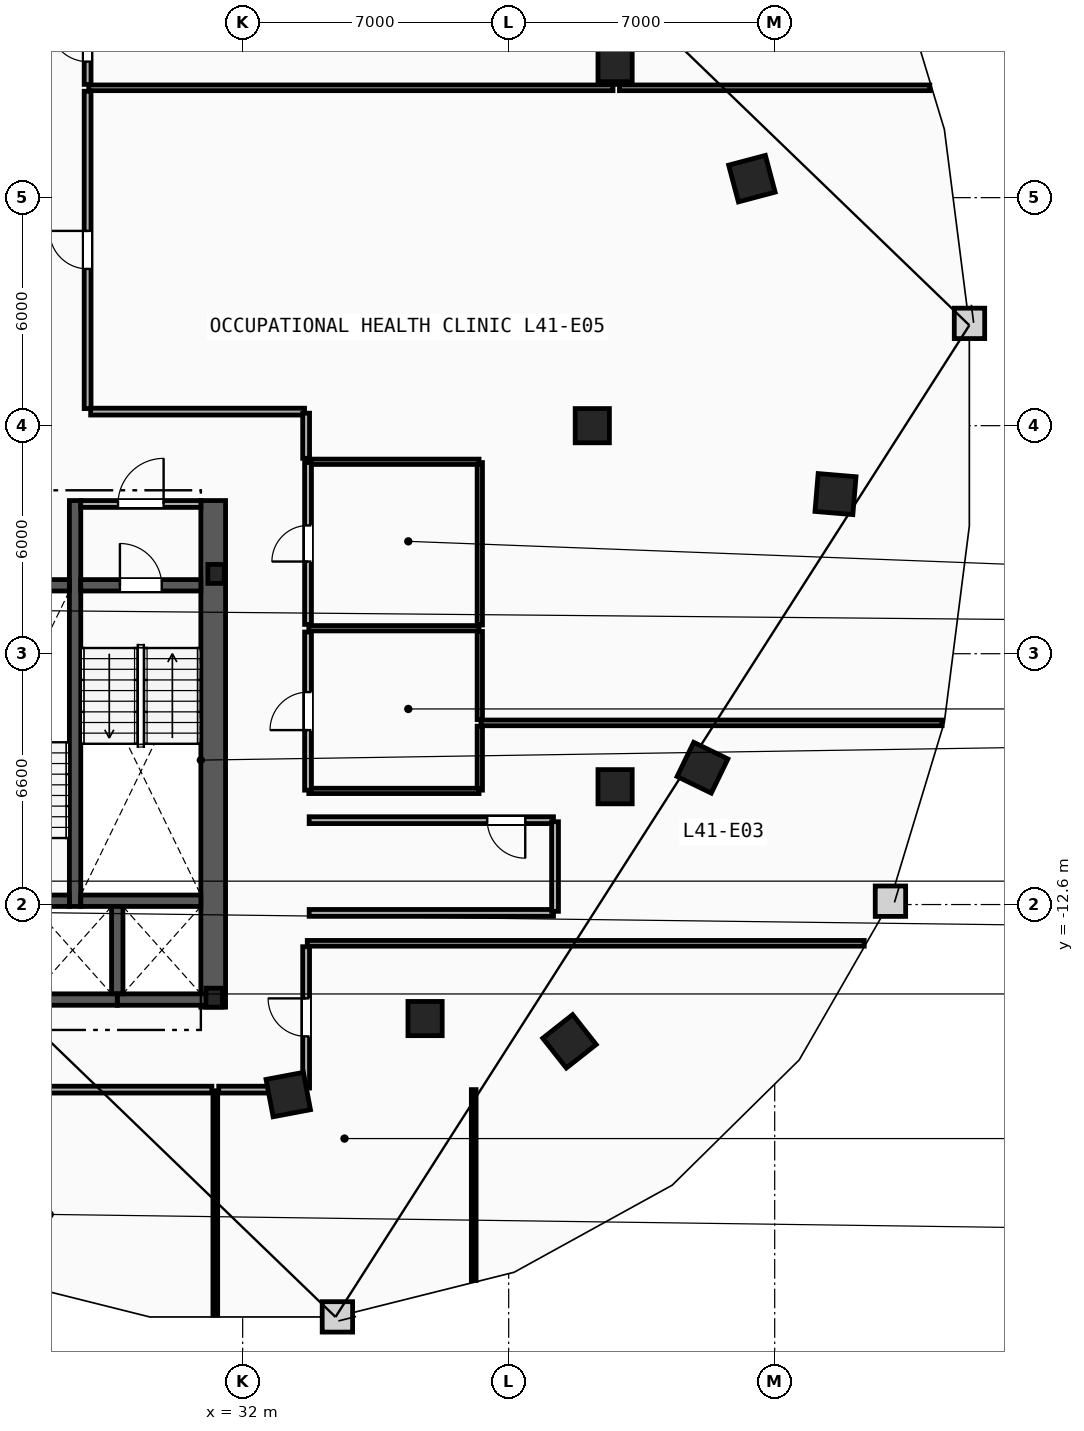
"""IFC4 building model, lengths in metres.
Left out: names, types, materials, properties, quantities, classifications, styles, units other than length and angle.
Written with IfcOpenShell. Run it as: python <this file> out.ifc"""

import sys

from ifc_helpers import new_model, si_unit, direction, frame, frame_2d, origin, origin_2d, place, context, subcontext, project, spatial, rectangle, i_section, extrude, element, fill, save


model = new_model("IFC4")
c1 = context("Model", 3, precision=1e-05, world=origin(), true_north=direction((0.0, 1.0)))
c2 = subcontext(c1, "Body", "Model", "MODEL_VIEW")
j1 = project(units=[si_unit("LENGTHUNIT", "METRE"), si_unit("PLANEANGLEUNIT", "RADIAN")], contexts=[c1])
p1 = place(None, origin())
s1 = spatial("IfcSite", under=j1, at=p1, CompositionType="ELEMENT")
p2 = place(p1, origin())
s2 = spatial("IfcBuilding", under=s1, at=p2, CompositionType="ELEMENT")
p3 = place(p2, frame((0.0, 0.0, 158.4)))
s3 = spatial("IfcBuildingStorey", under=s2, at=p3, CompositionType="ELEMENT", Elevation=158.4)
for number, where, z_axis, x_axis in (
    (1, (31.3, -3.9, 0.0), (0.0, 0.0, 1.0), (1.0, 0.0, 0.0)),
    (2, (31.25, -15.05, 0.0), (0.0, 0.0, 1.0), (1.0, 0.0, 0.0)),
):
    element("IfcColumn", number, at=place(p3, frame(where, z_axis=z_axis, x_axis=x_axis)), inside=s3, PredefinedType="COLUMN", context=c2, shape_type="SweptSolid", body=[
        extrude(i_section(OverallWidth=0.432, OverallDepth=0.498, WebThickness=0.056, FlangeThickness=0.089, FilletRadius=0.018, at=origin_2d()), origin(), (0.0, 0.0, 1.0), 3.6),
    ])
for number, where, z_axis, x_axis in (
    (3, (41.2, 0.0, 0.0), (0.0, 0.0, 1.0), (1.0, 0.0, 0.0)),
    (4, (41.8, -9.5, 0.0), (0.0, 0.0, 1.0), (1.0, 0.0, 0.0)),
    (5, (36.8, -15.6, 0.0), (0.0, 0.0, 1.0), (1.0, 0.0, 0.0)),
    (6, (41.8, 9.5, 0.0), (0.0, 0.0, 1.0), (1.0, 0.0, 0.0)),
):
    element("IfcColumn", number, at=place(p3, frame(where, z_axis=z_axis, x_axis=x_axis)), inside=s3, PredefinedType="COLUMN", context=c2, shape_type="SweptSolid", body=[
        extrude(rectangle(XDim=0.9, YDim=0.9, at=origin_2d()), origin(), (0.0, 0.0, 1.0), 3.6),
    ])
for number, where, z_axis, x_axis in (
    (7, (33.2, -17.6, 0.0), (0.0, 0.0, 1.0), (0.983, 0.186, 0.0)),
    (8, (40.6, -16.2, 0.0), (0.0, 0.0, 1.0), (0.785, 0.619, 0.0)),
    (9, (44.1, -9.0, 0.0), (0.0, 0.0, 1.0), (0.437, 0.899, 0.0)),
    (10, (47.6, -1.8, 0.0), (0.0, 0.0, 1.0), (0.084, 0.997, 0.0)),
    (11, (45.4, 6.5, 0.0), (0.0, 0.0, 1.0), (-0.256, 0.967, 0.0)),
):
    element("IfcColumn", number, at=place(p3, frame(where, z_axis=z_axis, x_axis=x_axis)), inside=s3, PredefinedType="COLUMN", context=c2, shape_type="SweptSolid", body=[
        extrude(rectangle(XDim=1.0, YDim=1.0, at=origin_2d()), origin(), (0.0, 0.0, 1.0), 3.6),
    ])
p4 = place(p3, frame((31.225, -15.3, 0.0), z_axis=(0.0, 0.0, 1.0), x_axis=(0.0, 1.0, 0.0)))
e12 = element("IfcWall", 12, at=p4, inside=s3, PredefinedType="SHEAR", context=c2, shape_type="SweptSolid", body=[
    extrude(rectangle(XDim=13.33, YDim=0.65, at=frame_2d((6.665, 0.0))), origin(), (0.0, 0.0, 1.0), 3.36),
])
p5 = place(p3, frame((27.59, -12.65, 0.0), z_axis=(0.0, 0.0, 1.0), x_axis=(0.0, 1.0, 0.0)))
e13 = element("IfcWall", 13, at=p5, inside=s3, PredefinedType="SHEAR", context=c2, shape_type="SweptSolid", body=[
    extrude(rectangle(XDim=10.68, YDim=0.3, at=frame_2d((5.34, 0.0))), origin(), (0.0, 0.0, 1.0), 3.36),
])
p6 = place(p3, frame((27.74, -4.2, 0.0), z_axis=(0.0, 0.0, 1.0), x_axis=(1.0, 0.0, 0.0)))
e14 = element("IfcWall", 14, at=p6, inside=s3, PredefinedType="SHEAR", context=c2, shape_type="SweptSolid", body=[
    extrude(rectangle(XDim=3.16, YDim=0.3, at=frame_2d((1.58, 0.0))), origin(), (0.0, 0.0, 1.0), 3.36),
])
p7 = place(p6, frame((1.03, 0.0, 0.0)))
e15 = element("IfcOpeningElement", 15, at=p7, cuts=e14, PredefinedType="OPENING", context=c2, shape_type="SweptSolid", body=[
    extrude(rectangle(XDim=1.1, YDim=2.15, at=frame_2d((0.55, 1.075))), frame((0.0, 0.16, 0.0), z_axis=(0.0, -1.0, 0.0), x_axis=(1.0, 0.0, 0.0)), (0.0, 0.0, 1.0), 0.32),
])
p8 = place(p3, frame((27.74, -12.5, 0.0), z_axis=(0.0, 0.0, 1.0), x_axis=(1.0, 0.0, 0.0)))
e16 = element("IfcWall", 16, at=p8, inside=s3, PredefinedType="SHEAR", context=c2, shape_type="SweptSolid", body=[
    extrude(rectangle(XDim=3.16, YDim=0.3, at=frame_2d((1.58, 0.0))), origin(), (0.0, 0.0, 1.0), 3.36),
])
p9 = place(p3, frame((24.28, -12.5, 0.0), z_axis=(0.0, 0.0, 1.0), x_axis=(1.0, 0.0, 0.0)))
e17 = element("IfcWall", 17, at=p9, inside=s3, PredefinedType="SHEAR", context=c2, shape_type="SweptSolid", body=[
    extrude(rectangle(XDim=3.16, YDim=0.3, at=frame_2d((1.58, 0.0))), origin(), (0.0, 0.0, 1.0), 3.36),
])
p10 = place(p9, frame((1.03, 0.0, 0.0)))
e18 = element("IfcOpeningElement", 18, at=p10, cuts=e17, PredefinedType="OPENING", context=c2, shape_type="SweptSolid", body=[
    extrude(rectangle(XDim=1.1, YDim=2.15, at=frame_2d((0.55, 1.075))), frame((0.0, 0.16, 0.0), z_axis=(0.0, -1.0, 0.0), x_axis=(1.0, 0.0, 0.0)), (0.0, 0.0, 1.0), 0.32),
])
p11 = place(p3, frame((24.28, -4.2, 0.0), z_axis=(0.0, 0.0, 1.0), x_axis=(1.0, 0.0, 0.0)))
e19 = element("IfcWall", 19, at=p11, inside=s3, PredefinedType="SHEAR", context=c2, shape_type="SweptSolid", body=[
    extrude(rectangle(XDim=3.16, YDim=0.3, at=frame_2d((1.58, 0.0))), origin(), (0.0, 0.0, 1.0), 3.36),
])
p12 = place(p3, frame((27.74, -2.06, 0.0), z_axis=(0.0, 0.0, 1.0), x_axis=(1.0, 0.0, 0.0)))
e20 = element("IfcWall", 20, at=p12, inside=s3, PredefinedType="PARTITIONING", context=c2, shape_type="SweptSolid", body=[
    extrude(rectangle(XDim=3.16, YDim=0.18, at=frame_2d((1.58, 0.0))), origin(), (0.0, 0.0, 1.0), 3.36),
])
p13 = place(p12, frame((0.98, 0.0, 0.0)))
e21 = element("IfcOpeningElement", 21, at=p13, cuts=e20, PredefinedType="OPENING", context=c2, shape_type="SweptSolid", body=[
    extrude(rectangle(XDim=1.2, YDim=2.15, at=frame_2d((0.6, 1.075))), frame((0.0, 0.1, 0.0), z_axis=(0.0, -1.0, 0.0), x_axis=(1.0, 0.0, 0.0)), (0.0, 0.0, 1.0), 0.2),
])
p14 = place(p3, frame((28.7, -15.1, 0.0), z_axis=(0.0, 0.0, 1.0), x_axis=(1.0, 0.0, 0.0)))
e22 = element("IfcWall", 22, at=p14, inside=s3, PredefinedType="SHEAR", context=c2, shape_type="SweptSolid", body=[
    extrude(rectangle(XDim=2.5, YDim=0.3, at=frame_2d((1.25, 0.0))), origin(), (0.0, 0.0, 1.0), 3.36),
])
p15 = place(p3, frame((28.7, -14.95, 0.0), z_axis=(0.0, 0.0, 1.0), x_axis=(0.0, 1.0, 0.0)))
e23 = element("IfcWall", 23, at=p15, inside=s3, PredefinedType="SHEAR", context=c2, shape_type="SweptSolid", body=[
    extrude(rectangle(XDim=2.3, YDim=0.3, at=frame_2d((1.15, 0.0))), origin(), (0.0, 0.0, 1.0), 3.36),
])
p16 = place(p3, frame((26.2, -15.1, 0.0), z_axis=(0.0, 0.0, 1.0), x_axis=(1.0, 0.0, 0.0)))
e24 = element("IfcWall", 24, at=p16, inside=s3, PredefinedType="SHEAR", context=c2, shape_type="SweptSolid", body=[
    extrude(rectangle(XDim=2.5, YDim=0.3, at=frame_2d((1.25, 0.0))), origin(), (0.0, 0.0, 1.0), 3.36),
])
p17 = place(p3, frame((38.24, -9.59, 0.0), z_axis=(0.0, 0.0, 1.0), x_axis=(0.0, 1.0, 0.0)))
e25 = element("IfcWall", 25, at=p17, inside=s3, PredefinedType="PARTITIONING", context=c2, shape_type="SweptSolid", body=[
    extrude(rectangle(XDim=1.685, YDim=0.14, at=frame_2d((0.843, 0.0))), origin(), (0.0, 0.0, 1.0), 3.36),
])
p18 = place(p3, frame((38.24, -7.735, 0.0), z_axis=(0.0, 0.0, 1.0), x_axis=(0.0, 1.0, 0.0)))
e26 = element("IfcWall", 26, at=p18, inside=s3, PredefinedType="PARTITIONING", context=c2, shape_type="SweptSolid", body=[
    extrude(rectangle(XDim=2.32, YDim=0.14, at=frame_2d((1.16, 0.0))), origin(), (0.0, 0.0, 1.0), 3.36),
])
p19 = place(p3, frame((38.24, -5.245, 0.0), z_axis=(0.0, 0.0, 1.0), x_axis=(0.0, 1.0, 0.0)))
e27 = element("IfcWall", 27, at=p19, inside=s3, PredefinedType="PARTITIONING", context=c2, shape_type="SweptSolid", body=[
    extrude(rectangle(XDim=4.275, YDim=0.14, at=frame_2d((2.138, 0.0))), origin(), (0.0, 0.0, 1.0), 3.36),
])
for number, where, z_axis, x_axis in (
    (28, (33.74, -0.95, 0.0), (0.0, 0.0, 1.0), (1.0, 0.0, 0.0)),
    (29, (33.74, -5.33, 0.0), (0.0, 0.0, 1.0), (1.0, 0.0, 0.0)),
    (30, (33.74, -9.61, 0.0), (0.0, 0.0, 1.0), (1.0, 0.0, 0.0)),
):
    element("IfcWall", number, at=place(p3, frame(where, z_axis=z_axis, x_axis=x_axis)), inside=s3, PredefinedType="PARTITIONING", context=c2, shape_type="SweptSolid", body=[
        extrude(rectangle(XDim=4.48, YDim=0.14, at=frame_2d((2.24, 0.0))), origin(), (0.0, 0.0, 1.0), 3.36),
    ])
p20 = place(p3, frame((33.72, -5.23, 0.0), z_axis=(0.0, 0.0, 1.0), x_axis=(0.0, 1.0, 0.0)))
e31 = element("IfcWall", 31, at=p20, inside=s3, PredefinedType="PARTITIONING", context=c2, shape_type="SweptSolid", body=[
    extrude(rectangle(XDim=4.26, YDim=0.18, at=frame_2d((2.13, 0.0))), origin(), (0.0, 0.0, 1.0), 3.36),
])
p21 = place(p20, frame((1.655, 0.0, 0.0)))
e32 = element("IfcOpeningElement", 32, at=p21, cuts=e31, PredefinedType="OPENING", context=c2, shape_type="SweptSolid", body=[
    extrude(rectangle(XDim=0.95, YDim=2.1, at=frame_2d((0.475, 1.05))), frame((0.0, 0.1, 0.0), z_axis=(0.0, -1.0, 0.0), x_axis=(1.0, 0.0, 0.0)), (0.0, 0.0, 1.0), 0.2),
])
p22 = place(p3, frame((33.72, -9.59, 0.0), z_axis=(0.0, 0.0, 1.0), x_axis=(0.0, 1.0, 0.0)))
e33 = element("IfcWall", 33, at=p22, inside=s3, PredefinedType="PARTITIONING", context=c2, shape_type="SweptSolid", body=[
    extrude(rectangle(XDim=4.16, YDim=0.18, at=frame_2d((2.08, 0.0))), origin(), (0.0, 0.0, 1.0), 3.36),
])
p23 = place(p22, frame((1.58, 0.0, 0.0)))
e34 = element("IfcOpeningElement", 34, at=p23, cuts=e33, PredefinedType="OPENING", context=c2, shape_type="SweptSolid", body=[
    extrude(rectangle(XDim=1.0, YDim=2.15, at=frame_2d((0.5, 1.075))), frame((0.0, 0.1, 0.0), z_axis=(0.0, -1.0, 0.0), x_axis=(1.0, 0.0, 0.0)), (0.0, 0.0, 1.0), 0.2),
])
p24 = place(p3, frame((27.95, 8.89, 0.0), z_axis=(0.0, 0.0, 1.0), x_axis=(1.0, 0.0, 0.0)))
e35 = element("IfcWall", 35, at=p24, inside=s3, PredefinedType="PARTITIONING", context=c2, shape_type="SweptSolid", body=[
    extrude(rectangle(XDim=13.795, YDim=0.15, at=frame_2d((6.897, 0.0))), origin(), (0.0, 0.0, 1.0), 3.36),
])
p25 = place(p3, frame((41.915, 8.89, 0.0), z_axis=(0.0, 0.0, 1.0), x_axis=(1.0, 0.0, 0.0)))
e36 = element("IfcWall", 36, at=p25, inside=s3, PredefinedType="PARTITIONING", context=c2, shape_type="SweptSolid", body=[
    extrude(rectangle(XDim=8.167, YDim=0.15, at=frame_2d((4.083, 0.0))), origin(), (0.0, 0.0, 1.0), 3.36),
])
p26 = place(p3, frame((38.27, -7.82, 0.0), z_axis=(0.0, 0.0, 1.0), x_axis=(1.0, 0.0, 0.0)))
e37 = element("IfcWall", 37, at=p26, inside=s3, PredefinedType="PARTITIONING", context=c2, shape_type="SweptSolid", body=[
    extrude(rectangle(XDim=12.136, YDim=0.15, at=frame_2d((6.068, 0.0))), origin(), (0.0, 0.0, 1.0), 3.36),
])
p27 = place(p3, frame((33.7, -13.62, 0.0), z_axis=(0.0, 0.0, 1.0), x_axis=(1.0, 0.0, 0.0)))
e38 = element("IfcWall", 38, at=p27, inside=s3, PredefinedType="PARTITIONING", context=c2, shape_type="SweptSolid", body=[
    extrude(rectangle(XDim=14.656, YDim=0.15, at=frame_2d((7.328, 0.0))), origin(), (0.0, 0.0, 1.0), 3.36),
])
p28 = place(p3, frame((31.28, -23.402, 0.0), z_axis=(0.0, 0.0, 1.0), x_axis=(0.0, 1.0, 0.0)))
e39 = element("IfcWall", 39, at=p28, inside=s3, PredefinedType="PARTITIONING", context=c2, shape_type="SweptSolid", body=[
    extrude(rectangle(XDim=5.902, YDim=0.125, at=frame_2d((2.951, 0.0))), origin(), (0.0, 0.0, 1.0), 3.36),
])
p29 = place(p3, frame((38.08, -22.491, 0.0), z_axis=(0.0, 0.0, 1.0), x_axis=(0.0, 1.0, 0.0)))
e40 = element("IfcWall", 40, at=p29, inside=s3, PredefinedType="PARTITIONING", context=c2, shape_type="SweptSolid", body=[
    extrude(rectangle(XDim=5.021, YDim=0.125, at=frame_2d((2.511, 0.0))), origin(), (0.0, 0.0, 1.0), 3.36),
])
p30 = place(p3, frame((18.342, -17.47, 0.0), z_axis=(0.0, 0.0, 1.0), x_axis=(1.0, 0.0, 0.0)))
e41 = element("IfcWall", 41, at=p30, inside=s3, PredefinedType="PARTITIONING", context=c2, shape_type="SweptSolid", body=[
    extrude(rectangle(XDim=12.848, YDim=0.18, at=frame_2d((6.424, 0.0))), origin(), (0.0, 0.0, 1.0), 3.36),
])
p31 = place(p30, frame((4.183, 0.0, 0.0)))
e42 = element("IfcOpeningElement", 42, at=p31, cuts=e41, PredefinedType="OPENING", context=c2, shape_type="SweptSolid", body=[
    extrude(rectangle(XDim=1.0, YDim=2.15, at=frame_2d((0.5, 1.075))), frame((0.0, 0.1, 0.0), z_axis=(0.0, -1.0, 0.0), x_axis=(1.0, 0.0, 0.0)), (0.0, 0.0, 1.0), 0.2),
])
p32 = place(p3, frame((33.67, -17.428, 0.0), z_axis=(0.0, 0.0, 1.0), x_axis=(0.0, 1.0, 0.0)))
e43 = element("IfcWall", 43, at=p32, inside=s3, PredefinedType="PARTITIONING", context=c2, shape_type="SweptSolid", body=[
    extrude(rectangle(XDim=3.719, YDim=0.18, at=frame_2d((1.859, 0.0))), origin(), (0.0, 0.0, 1.0), 3.36),
])
p33 = place(p32, frame((1.359, 0.0, 0.0)))
e44 = element("IfcOpeningElement", 44, at=p33, cuts=e43, PredefinedType="OPENING", context=c2, shape_type="SweptSolid", body=[
    extrude(rectangle(XDim=1.0, YDim=2.15, at=frame_2d((0.5, 1.075))), frame((0.0, 0.1, 0.0), z_axis=(0.0, -1.0, 0.0), x_axis=(1.0, 0.0, 0.0)), (0.0, 0.0, 1.0), 0.2),
])
p34 = place(p3, frame((31.37, -17.47, 0.0), z_axis=(0.0, 0.0, 1.0), x_axis=(1.0, 0.0, 0.0)))
e45 = element("IfcWall", 45, at=p34, inside=s3, PredefinedType="PARTITIONING", context=c2, shape_type="SweptSolid", body=[
    extrude(rectangle(XDim=2.258, YDim=0.18, at=frame_2d((1.129, 0.0))), origin(), (0.0, 0.0, 1.0), 3.36),
])
p35 = place(p3, frame((33.75, -12.82, 0.0), z_axis=(0.0, 0.0, 1.0), x_axis=(1.0, 0.0, 0.0)))
e46 = element("IfcWall", 46, at=p35, inside=s3, PredefinedType="PARTITIONING", context=c2, shape_type="SweptSolid", body=[
    extrude(rectangle(XDim=6.428, YDim=0.18, at=frame_2d((3.214, 0.0))), origin(), (0.0, 0.0, 1.0), 3.36),
])
p36 = place(p3, frame((40.178, -10.38, 0.0), z_axis=(0.0, 0.0, 1.0), x_axis=(-1.0, 0.0, 0.0)))
e47 = element("IfcWall", 47, at=p36, inside=s3, PredefinedType="PARTITIONING", context=c2, shape_type="SweptSolid", body=[
    extrude(rectangle(XDim=6.428, YDim=0.18, at=frame_2d((3.214, 0.0))), origin(), (0.0, 0.0, 1.0), 3.36),
])
p37 = place(p36, frame((0.743, 0.0, 0.0)))
e48 = element("IfcOpeningElement", 48, at=p37, cuts=e47, PredefinedType="OPENING", context=c2, shape_type="SweptSolid", body=[
    extrude(rectangle(XDim=1.0, YDim=2.15, at=frame_2d((0.5, 1.075))), frame((0.0, 0.1, 0.0), z_axis=(0.0, -1.0, 0.0), x_axis=(1.0, 0.0, 0.0)), (0.0, 0.0, 1.0), 0.2),
])
p38 = place(p3, frame((40.22, -12.779, 0.0), z_axis=(0.0, 0.0, 1.0), x_axis=(0.0, 1.0, 0.0)))
e49 = element("IfcWall", 49, at=p38, inside=s3, PredefinedType="PARTITIONING", context=c2, shape_type="SweptSolid", body=[
    extrude(rectangle(XDim=2.357, YDim=0.18, at=frame_2d((1.179, 0.0))), origin(), (0.0, 0.0, 1.0), 3.36),
])
p39 = place(p3, frame((27.92, 0.45, 0.0), z_axis=(0.0, 0.0, 1.0), x_axis=(0.0, 1.0, 0.0)))
e50 = element("IfcWall", 50, at=p39, inside=s3, PredefinedType="PARTITIONING", context=c2, shape_type="SweptSolid", body=[
    extrude(rectangle(XDim=8.35, YDim=0.18, at=frame_2d((4.175, 0.0))), origin(), (0.0, 0.0, 1.0), 3.36),
])
p40 = place(p39, frame((3.675, 0.0, 0.0)))
e51 = element("IfcOpeningElement", 51, at=p40, cuts=e50, PredefinedType="OPENING", context=c2, shape_type="SweptSolid", body=[
    extrude(rectangle(XDim=1.0, YDim=2.15, at=frame_2d((0.5, 1.075))), frame((0.0, 0.1, 0.0), z_axis=(0.0, -1.0, 0.0), x_axis=(1.0, 0.0, 0.0)), (0.0, 0.0, 1.0), 0.2),
])
p41 = place(p3, frame((33.628, 0.37, 0.0), z_axis=(0.0, 0.0, 1.0), x_axis=(-1.0, 0.0, 0.0)))
e52 = element("IfcWall", 52, at=p41, inside=s3, PredefinedType="PARTITIONING", context=c2, shape_type="SweptSolid", body=[
    extrude(rectangle(XDim=5.628, YDim=0.18, at=frame_2d((2.814, 0.0))), origin(), (0.0, 0.0, 1.0), 3.36),
])
p42 = place(p3, frame((33.67, -0.859, 0.0), z_axis=(0.0, 0.0, 1.0), x_axis=(0.0, 1.0, 0.0)))
e53 = element("IfcWall", 53, at=p42, inside=s3, PredefinedType="PARTITIONING", context=c2, shape_type="SweptSolid", body=[
    extrude(rectangle(XDim=1.187, YDim=0.18, at=frame_2d((0.594, 0.0))), origin(), (0.0, 0.0, 1.0), 3.36),
])
p43 = place(p3, frame((27.92, 8.98, 0.0), z_axis=(0.0, 0.0, 1.0), x_axis=(0.0, 1.0, 0.0)))
e54 = element("IfcWall", 54, at=p43, inside=s3, PredefinedType="PARTITIONING", context=c2, shape_type="SweptSolid", body=[
    extrude(rectangle(XDim=2.198, YDim=0.18, at=frame_2d((1.099, 0.0))), origin(), (0.0, 0.0, 1.0), 3.36),
])
p44 = place(p43, frame((0.599, 0.0, 0.0)))
e55 = element("IfcOpeningElement", 55, at=p44, cuts=e54, PredefinedType="OPENING", context=c2, shape_type="SweptSolid", body=[
    extrude(rectangle(XDim=1.0, YDim=2.15, at=frame_2d((0.5, 1.075))), frame((0.0, 0.1, 0.0), z_axis=(0.0, -1.0, 0.0), x_axis=(1.0, 0.0, 0.0)), (0.0, 0.0, 1.0), 0.2),
])
p45 = place(p3, frame((41.83, 8.98, 0.0), z_axis=(0.0, 0.0, 1.0), x_axis=(0.0, 1.0, 0.0)))
e56 = element("IfcWall", 56, at=p45, inside=s3, PredefinedType="PARTITIONING", context=c2, shape_type="SweptSolid", body=[
    extrude(rectangle(XDim=11.638, YDim=0.125, at=frame_2d((5.819, 0.0))), origin(), (0.0, 0.0, 1.0), 2.897),
])
p46 = place(p45, frame((3.76, 0.0, 0.0)))
e57 = element("IfcOpeningElement", 57, at=p46, cuts=e56, PredefinedType="OPENING", context=c2, shape_type="SweptSolid", body=[
    extrude(rectangle(XDim=1.0, YDim=2.15, at=frame_2d((0.5, 1.075))), frame((0.0, 0.073, 0.0), z_axis=(0.0, -1.0, 0.0), x_axis=(1.0, 0.0, 0.0)), (0.0, 0.0, 1.0), 0.145),
])
p47 = place(p7, origin())
e58 = element("IfcDoor", 58, at=p47, inside=s3, OperationType="SINGLE_SWING_LEFT", PredefinedType="DOOR", context=c2, shape_type="SweptSolid", body=[
    extrude(rectangle(XDim=1.1, YDim=2.15, at=frame_2d((0.55, 1.075))), frame((0.0, 0.025, 0.0), z_axis=(0.0, -1.0, 0.0), x_axis=(1.0, 0.0, 0.0)), (0.0, 0.0, 1.0), 0.05),
])
fill(e15, e58)
p48 = place(p13, origin())
e59 = element("IfcDoor", 59, at=p48, inside=s3, OperationType="SINGLE_SWING_RIGHT", PredefinedType="DOOR", context=c2, shape_type="SweptSolid", body=[
    extrude(rectangle(XDim=1.2, YDim=2.15, at=frame_2d((0.6, 1.075))), frame((0.0, 0.025, 0.0), z_axis=(0.0, -1.0, 0.0), x_axis=(1.0, 0.0, 0.0)), (0.0, 0.0, 1.0), 0.05),
])
fill(e21, e59)
p49 = place(p40, origin())
e60 = element("IfcDoor", 60, at=p49, inside=s3, OperationType="SINGLE_SWING_RIGHT", PredefinedType="DOOR", context=c2, shape_type="SweptSolid", body=[
    extrude(rectangle(XDim=1.0, YDim=2.15, at=frame_2d((0.5, 1.075))), frame((0.0, 0.025, 0.0), z_axis=(0.0, -1.0, 0.0), x_axis=(1.0, 0.0, 0.0)), (0.0, 0.0, 1.0), 0.05),
])
fill(e51, e60)
p50 = place(p21, origin())
e61 = element("IfcDoor", 61, at=p50, inside=s3, OperationType="SINGLE_SWING_LEFT", PredefinedType="DOOR", context=c2, shape_type="SweptSolid", body=[
    extrude(rectangle(XDim=0.95, YDim=2.1, at=frame_2d((0.475, 1.05))), frame((0.0, 0.025, 0.0), z_axis=(0.0, -1.0, 0.0), x_axis=(1.0, 0.0, 0.0)), (0.0, 0.0, 1.0), 0.05),
])
fill(e32, e61)
p51 = place(p23, origin())
e62 = element("IfcDoor", 62, at=p51, inside=s3, OperationType="SINGLE_SWING_LEFT", PredefinedType="DOOR", context=c2, shape_type="SweptSolid", body=[
    extrude(rectangle(XDim=1.0, YDim=2.15, at=frame_2d((0.5, 1.075))), frame((0.0, 0.025, 0.0), z_axis=(0.0, -1.0, 0.0), x_axis=(1.0, 0.0, 0.0)), (0.0, 0.0, 1.0), 0.05),
])
fill(e34, e62)
p52 = place(p33, origin())
e63 = element("IfcDoor", 63, at=p52, inside=s3, OperationType="SINGLE_SWING_RIGHT", PredefinedType="DOOR", context=c2, shape_type="SweptSolid", body=[
    extrude(rectangle(XDim=1.0, YDim=2.15, at=frame_2d((0.5, 1.075))), frame((0.0, 0.025, 0.0), z_axis=(0.0, -1.0, 0.0), x_axis=(1.0, 0.0, 0.0)), (0.0, 0.0, 1.0), 0.05),
])
fill(e44, e63)
p53 = place(p44, origin())
e64 = element("IfcDoor", 64, at=p53, inside=s3, OperationType="SINGLE_SWING_RIGHT", PredefinedType="DOOR", context=c2, shape_type="SweptSolid", body=[
    extrude(rectangle(XDim=1.0, YDim=2.15, at=frame_2d((0.5, 1.075))), frame((0.0, 0.025, 0.0), z_axis=(0.0, -1.0, 0.0), x_axis=(1.0, 0.0, 0.0)), (0.0, 0.0, 1.0), 0.05),
])
fill(e55, e64)
p54 = place(p37, origin())
e65 = element("IfcDoor", 65, at=p54, inside=s3, OperationType="SINGLE_SWING_LEFT", PredefinedType="DOOR", context=c2, shape_type="SweptSolid", body=[
    extrude(rectangle(XDim=1.0, YDim=2.15, at=frame_2d((0.5, 1.075))), frame((0.0, 0.025, 0.0), z_axis=(0.0, -1.0, 0.0), x_axis=(1.0, 0.0, 0.0)), (0.0, 0.0, 1.0), 0.05),
])
fill(e48, e65)
save(model, sys.argv[1])
